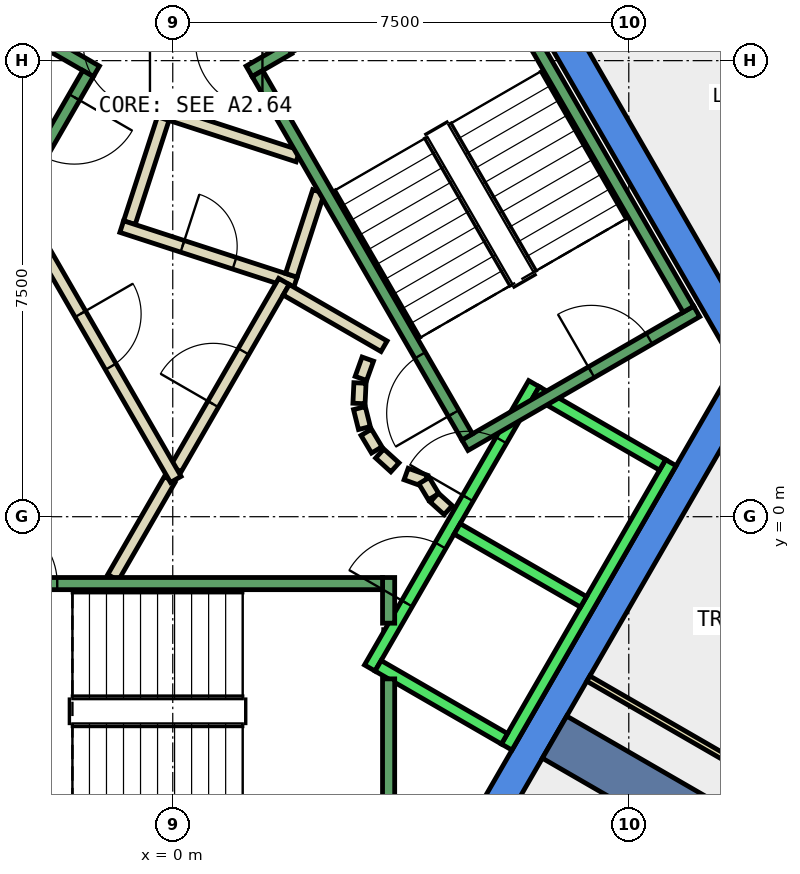
"""IFC4 building model, lengths in metres.
Left out: names, types, materials, properties, quantities, classifications, styles, units other than length and angle.
Written with IfcOpenShell. Run it as: python <this file> out.ifc"""

import sys

from ifc_helpers import new_model, si_unit, direction, frame, frame_2d, origin, place, context, subcontext, project, spatial, polyline, rectangle, outline, extrude, element, fill, save


model = new_model("IFC4")
c1 = context("Model", 3, precision=1e-05, world=origin(), true_north=direction((0.0, 1.0)))
c2 = subcontext(c1, "Body", "Model", "MODEL_VIEW")
j1 = project(units=[si_unit("LENGTHUNIT", "METRE"), si_unit("PLANEANGLEUNIT", "RADIAN")], contexts=[c1])
p1 = place(None, origin())
s1 = spatial("IfcSite", under=j1, at=p1, CompositionType="ELEMENT")
p2 = place(p1, origin())
s2 = spatial("IfcBuilding", under=s1, at=p2, CompositionType="ELEMENT")
p3 = place(p2, frame((0.0, 0.0, 300.8)))
s3 = spatial("IfcBuildingStorey", under=s2, at=p3, CompositionType="ELEMENT", Elevation=300.8)
p4 = place(p3, frame((0.0, 0.0, -0.34)))
e1 = element("IfcWall", 1, at=p4, inside=s3, PredefinedType="SHEAR", context=c2, shape_type="SweptSolid", body=[
    extrude(outline(polyline([(5.486, 9.998), (5.053, 9.748), (9.238, 2.5), (9.815, 2.5), (5.486, 9.998)])), origin(), (0.0, 0.0, 1.0), 3.6),
])
p5 = place(p3, frame((0.0, 0.0, -0.34)))
e2 = element("IfcWall", 2, at=p5, inside=s3, PredefinedType="SHEAR", context=c2, shape_type="SweptSolid", body=[
    extrude(outline(polyline([(4.907, -6.0), (9.815, 2.5), (9.238, 2.5), (4.619, -5.5), (4.907, -6.0)])), origin(), (0.0, 0.0, 1.0), 3.6),
])
p6 = place(p3, frame((6.279, -3.625, -0.34), z_axis=(0.0, 0.0, 1.0), x_axis=(0.866017533419, -0.500013631625, 0.0)))
e3 = element("IfcWall", 3, at=p6, inside=s3, PredefinedType="SHEAR", context=c2, shape_type="SweptSolid", body=[
    extrude(rectangle(XDim=9.0, YDim=0.8, at=frame_2d((4.5, 0.0))), origin(), (0.0, 0.0, 1.0), 3.6),
])
p7 = place(p3, frame((2.06, 5.931, 0.0), z_axis=(0.0, 0.0, 1.0), x_axis=(-0.95092855133, 0.309410552932, 0.0)))
e4 = element("IfcWall", 4, at=p7, inside=s3, PredefinedType="PARTITIONING", context=c2, shape_type="SweptSolid", body=[
    extrude(rectangle(XDim=2.399, YDim=0.2, at=frame_2d((1.199, 0.0))), origin(), (0.0, 0.0, 1.0), 3.26),
])
p8 = place(p3, frame((-0.157, 6.547, 0.0), z_axis=(0.0, 0.0, 1.0), x_axis=(-0.308813127339, -0.951122732555, 0.0)))
e5 = element("IfcWall", 5, at=p8, inside=s3, PredefinedType="PARTITIONING", context=c2, shape_type="SweptSolid", body=[
    extrude(rectangle(XDim=1.8, YDim=0.2, at=frame_2d((0.9, 0.0))), origin(), (0.0, 0.0, 1.0), 3.26),
])
p9 = place(p3, frame((-0.839, 4.771, 0.0), z_axis=(0.0, 0.0, 1.0), x_axis=(0.950961084355, -0.309310549515, 0.0)))
e6 = element("IfcWall", 6, at=p9, inside=s3, PredefinedType="PARTITIONING", context=c2, shape_type="SweptSolid", body=[
    extrude(rectangle(XDim=3.0, YDim=0.2, at=frame_2d((1.5, 0.0))), origin(), (0.0, 0.0, 1.0), 3.26),
])
p10 = place(p9, frame((1.05, 0.0, 0.0)))
e7 = element("IfcOpeningElement", 7, at=p10, cuts=e6, PredefinedType="OPENING", context=c2, shape_type="SweptSolid", body=[
    extrude(rectangle(XDim=0.9, YDim=2.1, at=frame_2d((0.45, 1.05))), frame((0.0, 0.11, 0.0), z_axis=(0.0, -1.0, 0.0), x_axis=(1.0, 0.0, 0.0)), (0.0, 0.0, 1.0), 0.22),
])
p11 = place(p3, frame((1.95, 3.97, 0.0), z_axis=(0.0, 0.0, 1.0), x_axis=(0.308583003896, 0.951197418892, 0.0)))
e8 = element("IfcWall", 8, at=p11, inside=s3, PredefinedType="PARTITIONING", context=c2, shape_type="SweptSolid", body=[
    extrude(rectangle(XDim=1.449, YDim=0.2, at=frame_2d((0.724, 0.0))), origin(), (0.0, 0.0, 1.0), 3.26),
])
p12 = place(p3, frame((8.545, 9.634, 0.0), z_axis=(0.0, 0.0, 1.0), x_axis=(0.50008212199, -0.86597798544, 0.0)))
e9 = element("IfcWall", 9, at=p12, inside=s3, PredefinedType="PARTITIONING", context=c2, shape_type="SweptSolid", body=[
    extrude(rectangle(XDim=3.995, YDim=0.2, at=frame_2d((1.998, 0.0))), origin(), (0.0, 0.0, 1.0), 3.26),
])
p13 = place(p12, frame((1.498, 0.0, 0.0)))
e10 = element("IfcOpeningElement", 10, at=p13, cuts=e9, PredefinedType="OPENING", context=c2, shape_type="SweptSolid", body=[
    extrude(rectangle(XDim=1.0, YDim=2.1, at=frame_2d((0.5, 1.05))), frame((0.0, 0.11, 0.0), z_axis=(0.0, -1.0, 0.0), x_axis=(1.0, 0.0, 0.0)), (0.0, 0.0, 1.0), 0.22),
])
p14 = place(p3, frame((-0.982, -1.0, 0.0), z_axis=(0.0, 0.0, 1.0), x_axis=(0.50024047865, 0.865886518847, 0.0)))
e11 = element("IfcWall", 11, at=p14, inside=s3, PredefinedType="PARTITIONING", context=c2, shape_type="SweptSolid", body=[
    extrude(rectangle(XDim=1.863, YDim=0.2, at=frame_2d((0.931, 0.0))), origin(), (0.0, 0.0, 1.0), 3.26),
])
p15 = place(p3, frame((0.05, 0.787, 0.0), z_axis=(0.0, 0.0, 1.0), x_axis=(0.499954076797, 0.866051915934, 0.0)))
e12 = element("IfcWall", 12, at=p15, inside=s3, PredefinedType="PARTITIONING", context=c2, shape_type="SweptSolid", body=[
    extrude(rectangle(XDim=3.558, YDim=0.2, at=frame_2d((1.779, 0.0))), origin(), (0.0, 0.0, 1.0), 3.26),
])
p16 = place(p15, frame((1.229, 0.0, 0.0)))
e13 = element("IfcOpeningElement", 13, at=p16, cuts=e12, PredefinedType="OPENING", context=c2, shape_type="SweptSolid", body=[
    extrude(rectangle(XDim=1.0, YDim=2.1, at=frame_2d((0.5, 1.05))), frame((0.0, 0.11, 0.0), z_axis=(0.0, -1.0, 0.0), x_axis=(1.0, 0.0, 0.0)), (0.0, 0.0, 1.0), 0.22),
])
p17 = place(p3, frame((1.866, 3.732, 0.0), z_axis=(0.0, 0.0, 1.0), x_axis=(0.866043361281, -0.499968895414, 0.0)))
e14 = element("IfcWall", 14, at=p17, inside=s3, PredefinedType="PARTITIONING", context=c2, shape_type="SweptSolid", body=[
    extrude(rectangle(XDim=1.858, YDim=0.2, at=frame_2d((0.929, 0.0))), origin(), (0.0, 0.0, 1.0), 3.26),
])
p18 = place(p3, frame((3.208, 2.592, 0.0), z_axis=(0.0, 0.0, 1.0), x_axis=(-0.337388820924, -0.941365382578, 0.0)))
e15 = element("IfcWall", 15, at=p18, inside=s3, PredefinedType="PARTITIONING", context=c2, shape_type="SweptSolid", body=[
    extrude(rectangle(XDim=0.338, YDim=0.2, at=frame_2d((0.169, 0.0))), origin(), (0.0, 0.0, 1.0), 3.26),
])
p19 = place(p3, frame((3.079, 2.199, 0.0), z_axis=(0.0, 0.0, 1.0), x_axis=(-0.047771483479, -0.998858290933, 0.0)))
e16 = element("IfcWall", 16, at=p19, inside=s3, PredefinedType="PARTITIONING", context=c2, shape_type="SweptSolid", body=[
    extrude(rectangle(XDim=0.337, YDim=0.2, at=frame_2d((0.169, 0.0))), origin(), (0.0, 0.0, 1.0), 3.26),
])
p20 = place(p3, frame((3.07, 1.786, 0.0), z_axis=(0.0, 0.0, 1.0), x_axis=(0.242705583207, -0.970099994784, 0.0)))
e17 = element("IfcWall", 17, at=p20, inside=s3, PredefinedType="PARTITIONING", context=c2, shape_type="SweptSolid", body=[
    extrude(rectangle(XDim=0.338, YDim=0.2, at=frame_2d((0.169, 0.0))), origin(), (0.0, 0.0, 1.0), 3.26),
])
for number, where, z_axis, x_axis in (
    (18, (3.182, 1.388, 0.0), (0.0, 0.0, 1.0), (0.512, -0.859, 0.0)),
    (19, (3.404, 1.039, 0.0), (0.0, 0.0, 1.0), (0.74, -0.672, 0.0)),
):
    element("IfcWall", number, at=place(p3, frame(where, z_axis=z_axis, x_axis=x_axis)), inside=s3, PredefinedType="PARTITIONING", context=c2, shape_type="SweptSolid", body=[
        extrude(rectangle(XDim=0.338, YDim=0.2, at=frame_2d((0.169, 0.0))), origin(), (0.0, 0.0, 1.0), 3.26),
    ])
p21 = place(p3, frame((3.838, 0.702, 0.0), z_axis=(0.0, 0.0, 1.0), x_axis=(0.941035081519, -0.338308993895, 0.0)))
e20 = element("IfcWall", 20, at=p21, inside=s3, PredefinedType="PARTITIONING", context=c2, shape_type="SweptSolid", body=[
    extrude(rectangle(XDim=0.337, YDim=0.2, at=frame_2d((0.168, 0.0))), origin(), (0.0, 0.0, 1.0), 3.26),
])
p22 = place(p3, frame((4.132, 0.593, 0.0), z_axis=(0.0, 0.0, 1.0), x_axis=(0.513561617048, -0.858052717201, 0.0)))
e21 = element("IfcWall", 21, at=p22, inside=s3, PredefinedType="PARTITIONING", context=c2, shape_type="SweptSolid", body=[
    extrude(rectangle(XDim=0.308, YDim=0.2, at=frame_2d((0.154, 0.0))), origin(), (0.0, 0.0, 1.0), 3.26),
])
p23 = place(p3, frame((4.301, 0.315, 0.0), z_axis=(0.0, 0.0, 1.0), x_axis=(0.741798017506, -0.670623367639, 0.0)))
e22 = element("IfcWall", 22, at=p23, inside=s3, PredefinedType="PARTITIONING", context=c2, shape_type="SweptSolid", body=[
    extrude(rectangle(XDim=0.309, YDim=0.2, at=frame_2d((0.154, 0.0))), origin(), (0.0, 0.0, 1.0), 3.26),
])
p24 = place(p3, frame((-2.54, 5.1, 0.0), z_axis=(0.0, 0.0, 1.0), x_axis=(0.499925051871, -0.866068670783, 0.0)))
e23 = element("IfcWall", 23, at=p24, inside=s3, PredefinedType="PARTITIONING", context=c2, shape_type="SweptSolid", body=[
    extrude(rectangle(XDim=5.181, YDim=0.2, at=frame_2d((2.59, 0.0))), origin(), (0.0, 0.0, 1.0), 3.26),
])
p25 = place(p24, frame((2.04, 0.0, 0.0)))
e24 = element("IfcOpeningElement", 24, at=p25, cuts=e23, PredefinedType="OPENING", context=c2, shape_type="SweptSolid", body=[
    extrude(rectangle(XDim=1.0, YDim=2.1, at=frame_2d((0.5, 1.05))), frame((0.0, 0.11, 0.0), z_axis=(0.0, -1.0, 0.0), x_axis=(1.0, 0.0, 0.0)), (0.0, 0.0, 1.0), 0.22),
])
p26 = place(p3, frame((6.835, -2.662, 0.0), z_axis=(0.0, 0.0, 1.0), x_axis=(0.866023427642, -0.500003422764, 0.0)))
e25 = element("IfcWall", 25, at=p26, inside=s3, PredefinedType="PARTITIONING", context=c2, shape_type="SweptSolid", body=[
    extrude(rectangle(XDim=8.65, YDim=0.1, at=frame_2d((4.325, 0.0))), origin(), (0.0, 0.0, 1.0), 3.26),
])
p27 = place(p3, frame((3.24, -2.488, 0.0), z_axis=(0.0, 0.0, 1.0), x_axis=(0.500034260056, 0.866005622828, 0.0)))
e26 = element("IfcWall", 26, at=p27, inside=s3, PredefinedType="STANDARD", context=c2, shape_type="SweptSolid", body=[
    extrude(rectangle(XDim=5.399, YDim=0.2, at=frame_2d((2.7, 0.0))), origin(), (0.0, 0.0, 1.0), 3.26),
])
p28 = place(p27, frame((3.225, 0.0, 0.0)))
e27 = element("IfcOpeningElement", 27, at=p28, cuts=e26, PredefinedType="OPENING", context=c2, shape_type="SweptSolid", body=[
    extrude(rectangle(XDim=1.1, YDim=2.1, at=frame_2d((0.55, 1.05))), frame((0.0, 0.11, 0.0), z_axis=(0.0, -1.0, 0.0), x_axis=(1.0, 0.0, 0.0)), (0.0, 0.0, 1.0), 0.22),
])
p29 = place(p27, frame((1.225, 0.0, 0.0)))
e28 = element("IfcOpeningElement", 28, at=p29, cuts=e26, PredefinedType="OPENING", context=c2, shape_type="SweptSolid", body=[
    extrude(rectangle(XDim=1.1, YDim=2.1, at=frame_2d((0.55, 1.05))), frame((0.0, 0.11, 0.0), z_axis=(0.0, -1.0, 0.0), x_axis=(1.0, 0.0, 0.0)), (0.0, 0.0, 1.0), 0.22),
])
p30 = place(p3, frame((5.492, -3.788, 0.0), z_axis=(0.0, 0.0, 1.0), x_axis=(0.500034260056, 0.866005622828, 0.0)))
e29 = element("IfcWall", 29, at=p30, inside=s3, PredefinedType="STANDARD", context=c2, shape_type="SweptSolid", body=[
    extrude(rectangle(XDim=5.399, YDim=0.2, at=frame_2d((2.7, 0.0))), origin(), (0.0, 0.0, 1.0), 3.26),
])
p31 = place(p3, frame((3.377, -2.452, 0.0), z_axis=(0.0, 0.0, 1.0), x_axis=(0.865955154139, -0.50012165622, 0.0)))
e30 = element("IfcWall", 30, at=p31, inside=s3, PredefinedType="STANDARD", context=c2, shape_type="SweptSolid", body=[
    extrude(rectangle(XDim=2.4, YDim=0.2, at=frame_2d((1.2, 0.0))), origin(), (0.0, 0.0, 1.0), 3.26),
])
for number, where, z_axis, x_axis in (
    (31, (4.677, -0.2, 0.0), (0.0, 0.0, 1.0), (0.866, -0.5, 0.0)),
    (32, (5.977, 2.052, 0.0), (0.0, 0.0, 1.0), (0.866, -0.5, 0.0)),
):
    element("IfcWall", number, at=place(p3, frame(where, z_axis=z_axis, x_axis=x_axis)), inside=s3, PredefinedType="STANDARD", context=c2, shape_type="SweptSolid", body=[
        extrude(rectangle(XDim=2.399, YDim=0.2, at=frame_2d((1.2, 0.0))), origin(), (0.0, 0.0, 1.0), 3.26),
    ])
p32 = place(p3, frame((3.55, -2.667, 0.0), z_axis=(0.0, 0.0, 1.0), x_axis=(0.0, -1.0, 0.0)))
e33 = element("IfcWall", 33, at=p32, inside=s3, PredefinedType="STANDARD", context=c2, shape_type="SweptSolid", body=[
    extrude(rectangle(XDim=2.733, YDim=0.2, at=frame_2d((1.366, 0.0))), origin(), (0.0, 0.0, 1.0), 3.26),
])
p33 = place(p3, frame((3.55, -1.0, 0.0), z_axis=(0.0, 0.0, 1.0), x_axis=(0.0, -1.0, 0.0)))
e34 = element("IfcWall", 34, at=p33, inside=s3, PredefinedType="STANDARD", context=c2, shape_type="SweptSolid", body=[
    extrude(rectangle(XDim=0.751, YDim=0.2, at=frame_2d((0.375, 0.0))), origin(), (0.0, 0.0, 1.0), 3.26),
])
p34 = place(p3, frame((-3.45, -1.1, 0.0), z_axis=(0.0, 0.0, 1.0), x_axis=(1.0, 0.0, 0.0)))
e35 = element("IfcWall", 35, at=p34, inside=s3, PredefinedType="STANDARD", context=c2, shape_type="SweptSolid", body=[
    extrude(rectangle(XDim=6.9, YDim=0.2, at=frame_2d((3.45, 0.0))), origin(), (0.0, 0.0, 1.0), 3.26),
])
p35 = place(p34, frame((0.45, 0.0, 0.0)))
e36 = element("IfcOpeningElement", 36, at=p35, cuts=e35, PredefinedType="OPENING", context=c2, shape_type="SweptSolid", body=[
    extrude(rectangle(XDim=1.1, YDim=2.2, at=frame_2d((0.55, 1.1))), frame((0.0, 0.11, 0.0), z_axis=(0.0, -1.0, 0.0), x_axis=(1.0, 0.0, 0.0)), (0.0, 0.0, 1.0), 0.22),
])
p36 = place(p3, frame((4.806, 1.176, 0.0), z_axis=(0.0, 0.0, 1.0), x_axis=(0.866059941101, 0.499940174841, 0.0)))
e37 = element("IfcWall", 37, at=p36, inside=s3, PredefinedType="STANDARD", context=c2, shape_type="SweptSolid", body=[
    extrude(rectangle(XDim=4.4, YDim=0.2, at=frame_2d((2.2, 0.0))), origin(), (0.0, 0.0, 1.0), 3.26),
])
p37 = place(p36, frame((2.4, 0.0, 0.0)))
e38 = element("IfcOpeningElement", 38, at=p37, cuts=e37, PredefinedType="OPENING", context=c2, shape_type="SweptSolid", body=[
    extrude(rectangle(XDim=1.1, YDim=2.2, at=frame_2d((0.55, 1.1))), frame((0.0, 0.11, 0.0), z_axis=(0.0, -1.0, 0.0), x_axis=(1.0, 0.0, 0.0)), (0.0, 0.0, 1.0), 0.22),
])
p38 = place(p3, frame((1.256, 7.324, 0.0), z_axis=(0.0, 0.0, 1.0), x_axis=(0.865915093549, 0.500191014278, 0.0)))
e39 = element("IfcWall", 39, at=p38, inside=s3, PredefinedType="STANDARD", context=c2, shape_type="SweptSolid", body=[
    extrude(rectangle(XDim=0.752, YDim=0.2, at=frame_2d((0.376, 0.0))), origin(), (0.0, 0.0, 1.0), 3.26),
])
p39 = place(p3, frame((4.843, 1.312, 0.0), z_axis=(0.0, 0.0, 1.0), x_axis=(-0.499963383562, 0.866046543262, 0.0)))
e40 = element("IfcWall", 40, at=p39, inside=s3, PredefinedType="STANDARD", context=c2, shape_type="SweptSolid", body=[
    extrude(rectangle(XDim=6.9, YDim=0.2, at=frame_2d((3.45, 0.0))), origin(), (0.0, 0.0, 1.0), 3.26),
])
p40 = place(p39, frame((0.45, 0.0, 0.0)))
e41 = element("IfcOpeningElement", 41, at=p40, cuts=e40, PredefinedType="OPENING", context=c2, shape_type="SweptSolid", body=[
    extrude(rectangle(XDim=1.1, YDim=2.2, at=frame_2d((0.55, 1.1))), frame((0.0, 0.11, 0.0), z_axis=(0.0, -1.0, 0.0), x_axis=(1.0, 0.0, 0.0)), (0.0, 0.0, 1.0), 0.22),
])
p41 = place(p3, frame((8.48, 3.412, 0.0), z_axis=(0.0, 0.0, 1.0), x_axis=(-0.499978703459, 0.866037698999, 0.0)))
e42 = element("IfcWall", 42, at=p41, inside=s3, PredefinedType="STANDARD", context=c2, shape_type="SweptSolid", body=[
    extrude(rectangle(XDim=6.9, YDim=0.2, at=frame_2d((3.45, 0.0))), origin(), (0.0, 0.0, 1.0), 3.26),
])
p42 = place(p3, frame((-1.256, 7.324, 0.0), z_axis=(0.0, 0.0, 1.0), x_axis=(-0.866046073146, 0.499964197906, 0.0)))
e43 = element("IfcWall", 43, at=p42, inside=s3, PredefinedType="STANDARD", context=c2, shape_type="SweptSolid", body=[
    extrude(rectangle(XDim=4.4, YDim=0.2, at=frame_2d((2.2, 0.0))), origin(), (0.0, 0.0, 1.0), 3.26),
])
p43 = place(p42, frame((2.4, 0.0, 0.0)))
e44 = element("IfcOpeningElement", 44, at=p43, cuts=e43, PredefinedType="OPENING", context=c2, shape_type="SweptSolid", body=[
    extrude(rectangle(XDim=1.1, YDim=2.2, at=frame_2d((0.55, 1.1))), frame((0.0, 0.11, 0.0), z_axis=(0.0, -1.0, 0.0), x_axis=(1.0, 0.0, 0.0)), (0.0, 0.0, 1.0), 0.22),
])
p44 = place(p3, frame((-1.393, 7.288, 0.0), z_axis=(0.0, 0.0, 1.0), x_axis=(-0.499963383562, -0.866046543262, 0.0)))
e45 = element("IfcWall", 45, at=p44, inside=s3, PredefinedType="STANDARD", context=c2, shape_type="SweptSolid", body=[
    extrude(rectangle(XDim=6.9, YDim=0.2, at=frame_2d((3.45, 0.0))), origin(), (0.0, 0.0, 1.0), 3.26),
])
p45 = place(p44, frame((0.45, 0.0, 0.0)))
e46 = element("IfcOpeningElement", 46, at=p45, cuts=e45, PredefinedType="OPENING", context=c2, shape_type="SweptSolid", body=[
    extrude(rectangle(XDim=1.1, YDim=2.2, at=frame_2d((0.55, 1.1))), frame((0.0, 0.11, 0.0), z_axis=(0.0, -1.0, 0.0), x_axis=(1.0, 0.0, 0.0)), (0.0, 0.0, 1.0), 0.22),
])
p46 = place(p16, origin())
e47 = element("IfcDoor", 47, at=p46, inside=s3, OperationType="SINGLE_SWING_RIGHT", PredefinedType="DOOR", context=c2, shape_type="SweptSolid", body=[
    extrude(rectangle(XDim=1.0, YDim=2.1, at=frame_2d((0.5, 1.05))), frame((0.0, 0.025, 0.0), z_axis=(0.0, -1.0, 0.0), x_axis=(1.0, 0.0, 0.0)), (0.0, 0.0, 1.0), 0.05),
])
fill(e13, e47)
p47 = place(p25, origin())
e48 = element("IfcDoor", 48, at=p47, inside=s3, OperationType="SINGLE_SWING_RIGHT", PredefinedType="DOOR", context=c2, shape_type="SweptSolid", body=[
    extrude(rectangle(XDim=1.0, YDim=2.1, at=frame_2d((0.5, 1.05))), frame((0.0, 0.025, 0.0), z_axis=(0.0, -1.0, 0.0), x_axis=(1.0, 0.0, 0.0)), (0.0, 0.0, 1.0), 0.05),
])
fill(e24, e48)
p48 = place(p10, origin())
e49 = element("IfcDoor", 49, at=p48, inside=s3, OperationType="SINGLE_SWING_LEFT", PredefinedType="DOOR", context=c2, shape_type="SweptSolid", body=[
    extrude(rectangle(XDim=0.9, YDim=2.1, at=frame_2d((0.45, 1.05))), frame((0.0, 0.025, 0.0), z_axis=(0.0, -1.0, 0.0), x_axis=(1.0, 0.0, 0.0)), (0.0, 0.0, 1.0), 0.05),
])
fill(e7, e49)
p49 = place(p28, origin())
e50 = element("IfcDoor", 50, at=p49, inside=s3, OperationType="SLIDING_TO_LEFT", PredefinedType="DOOR", context=c2, shape_type="SweptSolid", body=[
    extrude(rectangle(XDim=1.1, YDim=2.1, at=frame_2d((0.55, 1.05))), frame((0.0, 0.025, 0.0), z_axis=(0.0, -1.0, 0.0), x_axis=(1.0, 0.0, 0.0)), (0.0, 0.0, 1.0), 0.05),
])
fill(e27, e50)
p50 = place(p29, origin())
e51 = element("IfcDoor", 51, at=p50, inside=s3, OperationType="SLIDING_TO_LEFT", PredefinedType="DOOR", context=c2, shape_type="SweptSolid", body=[
    extrude(rectangle(XDim=1.1, YDim=2.1, at=frame_2d((0.55, 1.05))), frame((0.0, 0.025, 0.0), z_axis=(0.0, -1.0, 0.0), x_axis=(1.0, 0.0, 0.0)), (0.0, 0.0, 1.0), 0.05),
])
fill(e28, e51)
p51 = place(p35, origin())
e52 = element("IfcDoor", 52, at=p51, inside=s3, OperationType="SINGLE_SWING_LEFT", PredefinedType="DOOR", context=c2, shape_type="SweptSolid", body=[
    extrude(rectangle(XDim=1.1, YDim=2.2, at=frame_2d((0.55, 1.1))), frame((0.0, 0.025, 0.0), z_axis=(0.0, -1.0, 0.0), x_axis=(1.0, 0.0, 0.0)), (0.0, 0.0, 1.0), 0.05),
])
fill(e36, e52)
p52 = place(p40, origin())
e53 = element("IfcDoor", 53, at=p52, inside=s3, OperationType="SINGLE_SWING_LEFT", PredefinedType="DOOR", context=c2, shape_type="SweptSolid", body=[
    extrude(rectangle(XDim=1.1, YDim=2.2, at=frame_2d((0.55, 1.1))), frame((0.0, 0.025, 0.0), z_axis=(0.0, -1.0, 0.0), x_axis=(1.0, 0.0, 0.0)), (0.0, 0.0, 1.0), 0.05),
])
fill(e41, e53)
p53 = place(p37, origin())
e54 = element("IfcDoor", 54, at=p53, inside=s3, OperationType="SINGLE_SWING_LEFT", PredefinedType="DOOR", context=c2, shape_type="SweptSolid", body=[
    extrude(rectangle(XDim=1.1, YDim=2.2, at=frame_2d((0.55, 1.1))), frame((0.0, 0.025, 0.0), z_axis=(0.0, -1.0, 0.0), x_axis=(1.0, 0.0, 0.0)), (0.0, 0.0, 1.0), 0.05),
])
fill(e38, e54)
p54 = place(p45, origin())
e55 = element("IfcDoor", 55, at=p54, inside=s3, OperationType="SINGLE_SWING_LEFT", PredefinedType="DOOR", context=c2, shape_type="SweptSolid", body=[
    extrude(rectangle(XDim=1.1, YDim=2.2, at=frame_2d((0.55, 1.1))), frame((0.0, 0.025, 0.0), z_axis=(0.0, -1.0, 0.0), x_axis=(1.0, 0.0, 0.0)), (0.0, 0.0, 1.0), 0.05),
])
fill(e46, e55)
save(model, sys.argv[1])
